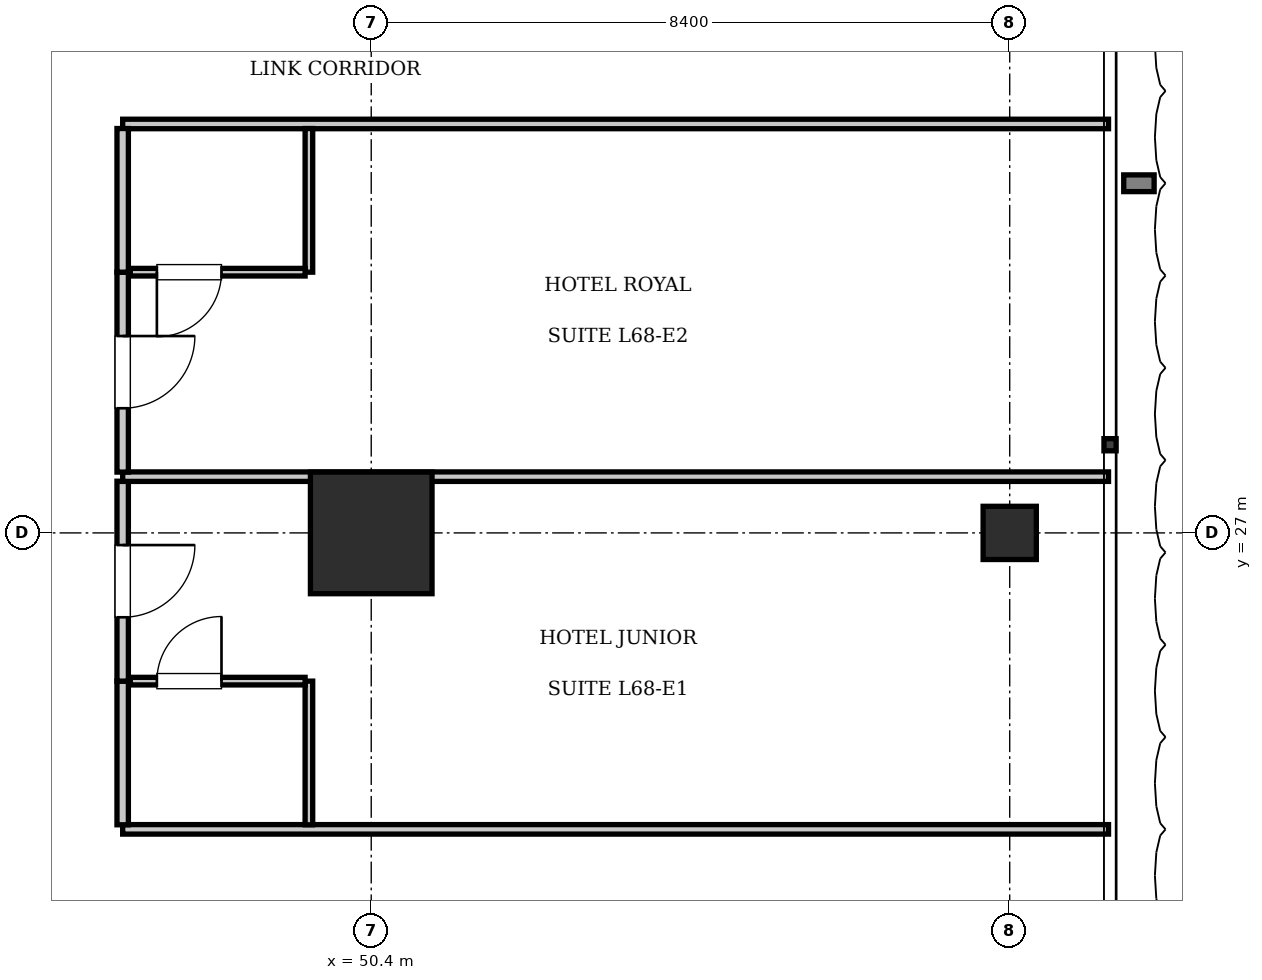
"""IFC4 building model, lengths in metres.
Left out: names, types, materials, properties, quantities, classifications, styles, units other than length and angle.
Written with IfcOpenShell. Run it as: python <this file> out.ifc"""

import sys

from ifc_helpers import new_model, si_unit, direction, frame, frame_2d, origin, origin_2d, place, context, subcontext, project, spatial, rectangle, extrude, element, fill, save


model = new_model("IFC4")
c1 = context("Model", 3, precision=1e-05, world=origin(), true_north=direction((0.0, 1.0)))
c2 = subcontext(c1, "Body", "Model", "MODEL_VIEW")
j1 = project(units=[si_unit("LENGTHUNIT", "METRE"), si_unit("PLANEANGLEUNIT", "RADIAN")], contexts=[c1])
p1 = place(None, origin())
s1 = spatial("IfcSite", under=j1, at=p1, CompositionType="ELEMENT")
p2 = place(p1, origin())
s2 = spatial("IfcBuilding", under=s1, at=p2, CompositionType="ELEMENT")
p3 = place(p2, frame((0.0, 0.0, 277.9)))
s3 = spatial("IfcBuildingStorey", under=s2, at=p3, CompositionType="ELEMENT", Elevation=277.9)
p4 = place(p3, frame((50.4, 27.0, 0.0), z_axis=(0.0, 0.0, 1.0), x_axis=(1.0, 0.0, 0.0)))
e1 = element("IfcColumn", 1, at=p4, inside=s3, PredefinedType="COLUMN", context=c2, shape_type="SweptSolid", body=[
    extrude(rectangle(XDim=1.6, YDim=1.6, at=origin_2d()), origin(), (0.0, 0.0, 1.0), 3.85),
])
p5 = place(p3, frame((58.8, 27.0, 0.0), z_axis=(0.0, 0.0, 1.0), x_axis=(1.0, 0.0, 0.0)))
e2 = element("IfcColumn", 2, at=p5, inside=s3, PredefinedType="COLUMN", context=c2, shape_type="SweptSolid", body=[
    extrude(rectangle(XDim=0.7, YDim=0.7, at=origin_2d()), origin(), (0.0, 0.0, 1.0), 3.85),
])
for number, where, z_axis, x_axis in (
    (3, (47.13, 23.1, 0.0), (0.0, 0.0, 1.0), (1.0, 0.0, 0.0)),
    (4, (47.13, 32.38, 0.0), (0.0, 0.0, 1.0), (1.0, 0.0, 0.0)),
):
    element("IfcWall", number, at=place(p3, frame(where, z_axis=z_axis, x_axis=x_axis)), inside=s3, PredefinedType="PARTITIONING", context=c2, shape_type="SweptSolid", body=[
        extrude(rectangle(XDim=12.97, YDim=0.125, at=frame_2d((6.485, 0.0))), origin(), (0.0, 0.0, 1.0), 3.61),
    ])
p6 = place(p3, frame((47.13, 23.16, 0.0), z_axis=(0.0, 0.0, 1.0), x_axis=(0.0, 1.0, 0.0)))
e5 = element("IfcWall", 5, at=p6, inside=s3, PredefinedType="PARTITIONING", context=c2, shape_type="SweptSolid", body=[
    extrude(rectangle(XDim=1.89, YDim=0.15, at=frame_2d((0.945, 0.0))), origin(), (0.0, 0.0, 1.0), 3.61),
])
p7 = place(p3, frame((47.13, 25.05, 0.0), z_axis=(0.0, 0.0, 1.0), x_axis=(0.0, 1.0, 0.0)))
e6 = element("IfcWall", 6, at=p7, inside=s3, PredefinedType="PARTITIONING", context=c2, shape_type="SweptSolid", body=[
    extrude(rectangle(XDim=2.63, YDim=0.15, at=frame_2d((1.315, 0.0))), origin(), (0.0, 0.0, 1.0), 3.61),
])
p8 = place(p7, frame((0.84, 0.0, 0.0)))
e7 = element("IfcOpeningElement", 7, at=p8, cuts=e6, PredefinedType="OPENING", context=c2, shape_type="SweptSolid", body=[
    extrude(rectangle(XDim=0.95, YDim=2.15, at=frame_2d((0.475, 1.075))), frame((0.0, 0.085, 0.0), z_axis=(0.0, -1.0, 0.0), x_axis=(1.0, 0.0, 0.0)), (0.0, 0.0, 1.0), 0.17),
])
p9 = place(p3, frame((49.58, 23.16, 0.0), z_axis=(0.0, 0.0, 1.0), x_axis=(0.0, 1.0, 0.0)))
e8 = element("IfcWall", 8, at=p9, inside=s3, PredefinedType="PARTITIONING", context=c2, shape_type="SweptSolid", body=[
    extrude(rectangle(XDim=1.89, YDim=0.1, at=frame_2d((0.945, 0.0))), origin(), (0.0, 0.0, 1.0), 3.61),
])
p10 = place(p3, frame((47.23, 25.05, 0.0), z_axis=(0.0, 0.0, 1.0), x_axis=(1.0, 0.0, 0.0)))
e9 = element("IfcWall", 9, at=p10, inside=s3, PredefinedType="PARTITIONING", context=c2, shape_type="SweptSolid", body=[
    extrude(rectangle(XDim=2.3, YDim=0.1, at=frame_2d((1.15, 0.0))), origin(), (0.0, 0.0, 1.0), 3.61),
])
p11 = place(p10, frame((0.35, 0.0, 0.0)))
e10 = element("IfcOpeningElement", 10, at=p11, cuts=e9, PredefinedType="OPENING", context=c2, shape_type="SweptSolid", body=[
    extrude(rectangle(XDim=0.85, YDim=2.1, at=frame_2d((0.425, 1.05))), frame((0.0, 0.06, 0.0), z_axis=(0.0, -1.0, 0.0), x_axis=(1.0, 0.0, 0.0)), (0.0, 0.0, 1.0), 0.12),
])
p12 = place(p3, frame((47.13, 27.74, 0.0), z_axis=(0.0, 0.0, 1.0), x_axis=(1.0, 0.0, 0.0)))
e11 = element("IfcWall", 11, at=p12, inside=s3, PredefinedType="PARTITIONING", context=c2, shape_type="SweptSolid", body=[
    extrude(rectangle(XDim=12.97, YDim=0.125, at=frame_2d((6.485, 0.0))), origin(), (0.0, 0.0, 1.0), 3.61),
])
p13 = place(p3, frame((47.13, 27.8, 0.0), z_axis=(0.0, 0.0, 1.0), x_axis=(0.0, 1.0, 0.0)))
e12 = element("IfcWall", 12, at=p13, inside=s3, PredefinedType="PARTITIONING", context=c2, shape_type="SweptSolid", body=[
    extrude(rectangle(XDim=2.63, YDim=0.15, at=frame_2d((1.315, 0.0))), origin(), (0.0, 0.0, 1.0), 3.61),
])
p14 = place(p13, frame((0.84, 0.0, 0.0)))
e13 = element("IfcOpeningElement", 13, at=p14, cuts=e12, PredefinedType="OPENING", context=c2, shape_type="SweptSolid", body=[
    extrude(rectangle(XDim=0.95, YDim=2.15, at=frame_2d((0.475, 1.075))), frame((0.0, 0.085, 0.0), z_axis=(0.0, -1.0, 0.0), x_axis=(1.0, 0.0, 0.0)), (0.0, 0.0, 1.0), 0.17),
])
p15 = place(p3, frame((47.13, 30.43, 0.0), z_axis=(0.0, 0.0, 1.0), x_axis=(0.0, 1.0, 0.0)))
e14 = element("IfcWall", 14, at=p15, inside=s3, PredefinedType="PARTITIONING", context=c2, shape_type="SweptSolid", body=[
    extrude(rectangle(XDim=1.89, YDim=0.15, at=frame_2d((0.945, 0.0))), origin(), (0.0, 0.0, 1.0), 3.61),
])
p16 = place(p3, frame((49.58, 30.43, 0.0), z_axis=(0.0, 0.0, 1.0), x_axis=(0.0, 1.0, 0.0)))
e15 = element("IfcWall", 15, at=p16, inside=s3, PredefinedType="PARTITIONING", context=c2, shape_type="SweptSolid", body=[
    extrude(rectangle(XDim=1.89, YDim=0.1, at=frame_2d((0.945, 0.0))), origin(), (0.0, 0.0, 1.0), 3.61),
])
p17 = place(p3, frame((47.23, 30.43, 0.0), z_axis=(0.0, 0.0, 1.0), x_axis=(1.0, 0.0, 0.0)))
e16 = element("IfcWall", 16, at=p17, inside=s3, PredefinedType="PARTITIONING", context=c2, shape_type="SweptSolid", body=[
    extrude(rectangle(XDim=2.3, YDim=0.1, at=frame_2d((1.15, 0.0))), origin(), (0.0, 0.0, 1.0), 3.61),
])
p18 = place(p17, frame((0.35, 0.0, 0.0)))
e17 = element("IfcOpeningElement", 17, at=p18, cuts=e16, PredefinedType="OPENING", context=c2, shape_type="SweptSolid", body=[
    extrude(rectangle(XDim=0.85, YDim=2.1, at=frame_2d((0.425, 1.05))), frame((0.0, 0.06, 0.0), z_axis=(0.0, -1.0, 0.0), x_axis=(1.0, 0.0, 0.0)), (0.0, 0.0, 1.0), 0.12),
])
p19 = place(p11, origin())
e18 = element("IfcDoor", 18, at=p19, inside=s3, OperationType="SINGLE_SWING_RIGHT", PredefinedType="DOOR", context=c2, shape_type="SweptSolid", body=[
    extrude(rectangle(XDim=0.85, YDim=2.1, at=frame_2d((0.425, 1.05))), frame((0.0, 0.025, 0.0), z_axis=(0.0, -1.0, 0.0), x_axis=(1.0, 0.0, 0.0)), (0.0, 0.0, 1.0), 0.05),
])
fill(e10, e18)
p20 = place(p8, frame((0.95, 0.0, 0.0), z_axis=(0.0, 0.0, 1.0), x_axis=(-1.0, 0.0, 0.0)))
e19 = element("IfcDoor", 19, at=p20, inside=s3, OperationType="SINGLE_SWING_LEFT", PredefinedType="DOOR", context=c2, shape_type="SweptSolid", body=[
    extrude(rectangle(XDim=0.95, YDim=2.15, at=frame_2d((0.475, 1.075))), frame((0.0, 0.025, 0.0), z_axis=(0.0, -1.0, 0.0), x_axis=(1.0, 0.0, 0.0)), (0.0, 0.0, 1.0), 0.05),
])
fill(e7, e19)
p21 = place(p18, frame((0.85, 0.0, 0.0), z_axis=(0.0, 0.0, 1.0), x_axis=(-1.0, 0.0, 0.0)))
e20 = element("IfcDoor", 20, at=p21, inside=s3, OperationType="SINGLE_SWING_RIGHT", PredefinedType="DOOR", context=c2, shape_type="SweptSolid", body=[
    extrude(rectangle(XDim=0.85, YDim=2.1, at=frame_2d((0.425, 1.05))), frame((0.0, 0.025, 0.0), z_axis=(0.0, -1.0, 0.0), x_axis=(1.0, 0.0, 0.0)), (0.0, 0.0, 1.0), 0.05),
])
fill(e17, e20)
p22 = place(p14, frame((0.95, 0.0, 0.0), z_axis=(0.0, 0.0, 1.0), x_axis=(-1.0, 0.0, 0.0)))
e21 = element("IfcDoor", 21, at=p22, inside=s3, OperationType="SINGLE_SWING_LEFT", PredefinedType="DOOR", context=c2, shape_type="SweptSolid", body=[
    extrude(rectangle(XDim=0.95, YDim=2.15, at=frame_2d((0.475, 1.075))), frame((0.0, 0.025, 0.0), z_axis=(0.0, -1.0, 0.0), x_axis=(1.0, 0.0, 0.0)), (0.0, 0.0, 1.0), 0.05),
])
fill(e13, e21)
save(model, sys.argv[1])
